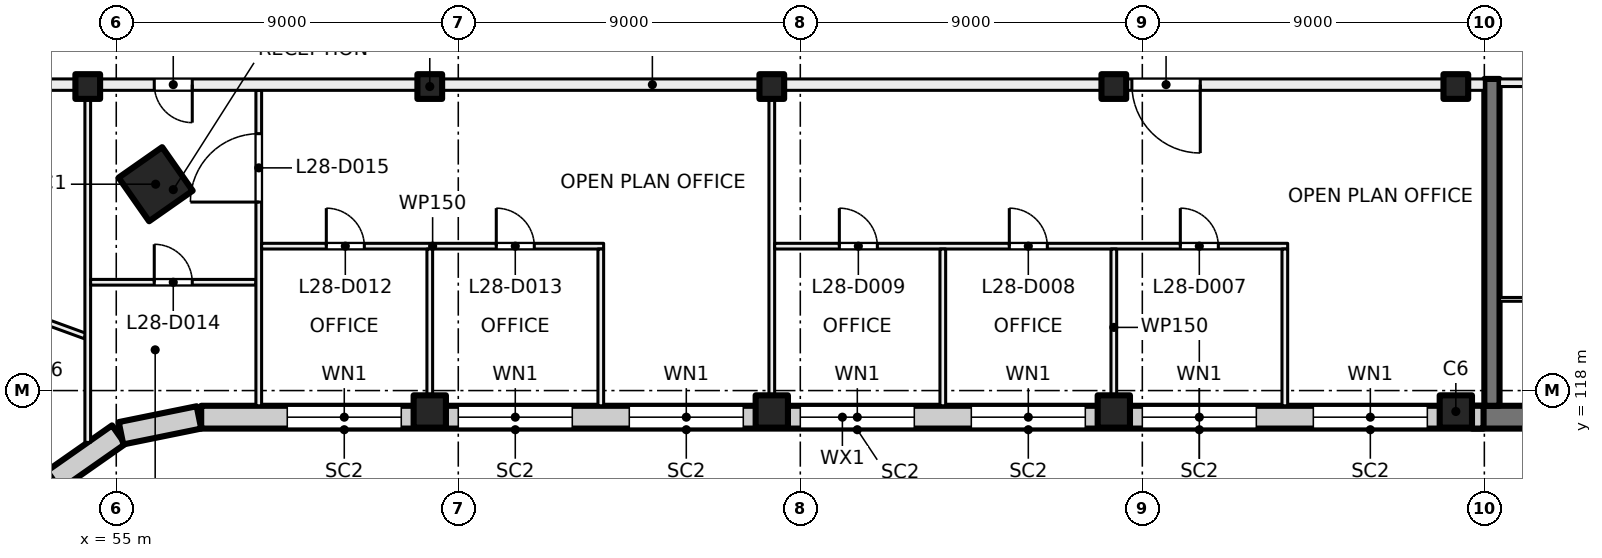
"""IFC4 building model, lengths in metres.
Left out: names, types, materials, properties, quantities, classifications, styles, units other than length and angle.
Written with IfcOpenShell. Run it as: python <this file> out.ifc"""

import sys

from ifc_helpers import new_model, si_unit, direction, frame, frame_2d, origin, origin_2d, place, context, subcontext, project, spatial, rectangle, hollow_rectangle, extrude, element, fill, save


model = new_model("IFC4")
c1 = context("Model", 3, precision=1e-05, world=origin(), true_north=direction((0.0, 1.0)))
c2 = subcontext(c1, "Body", "Model", "MODEL_VIEW")
j1 = project(units=[si_unit("LENGTHUNIT", "METRE"), si_unit("PLANEANGLEUNIT", "RADIAN")], contexts=[c1])
p1 = place(None, origin())
s1 = spatial("IfcSite", under=j1, at=p1, CompositionType="ELEMENT")
p2 = place(p1, origin())
s2 = spatial("IfcBuilding", under=s1, at=p2, CompositionType="ELEMENT")
p3 = place(p2, frame((0.0, 0.0, 121.0)))
s3 = spatial("IfcBuildingStorey", under=s2, at=p3, CompositionType="ELEMENT", Elevation=121.0)
p4 = place(p3, frame((56.036, 123.43, 0.0), z_axis=(0.0, 0.0, 1.0), x_axis=(0.573576436351, -0.819152044289, 0.0)))
e1 = element("IfcColumn", 1, at=p4, inside=s3, PredefinedType="COLUMN", context=c2, shape_type="SweptSolid", body=[
    extrude(hollow_rectangle(XDim=1.4, YDim=1.4, WallThickness=0.04, at=origin_2d()), origin(), (0.0, 0.0, 1.0), 4.0),
])
for number, where, z_axis, x_axis in (
    (2, (54.25, 126.0, 0.0), (0.0, 0.0, 1.0), (1.0, 0.0, 0.0)),
    (3, (63.25, 126.0, 0.0), (0.0, 0.0, 1.0), (1.0, 0.0, 0.0)),
    (4, (72.25, 126.0, 0.0), (0.0, 0.0, 1.0), (1.0, 0.0, 0.0)),
    (5, (81.25, 126.0, 0.0), (0.0, 0.0, 1.0), (1.0, 0.0, 0.0)),
    (6, (90.25, 126.0, 0.0), (0.0, 0.0, 1.0), (1.0, 0.0, 0.0)),
):
    element("IfcColumn", number, at=place(p3, frame(where, z_axis=z_axis, x_axis=x_axis)), inside=s3, PredefinedType="COLUMN", context=c2, shape_type="SweptSolid", body=[
        extrude(rectangle(XDim=0.65, YDim=0.65, at=origin_2d()), origin(), (0.0, 0.0, 1.0), 4.0),
    ])
for number, where, z_axis, x_axis in (
    (7, (63.25, 117.45, 0.0), (0.0, 0.0, 1.0), (1.0, 0.0, 0.0)),
    (8, (72.25, 117.45, 0.0), (0.0, 0.0, 1.0), (1.0, 0.0, 0.0)),
    (9, (81.25, 117.45, 0.0), (0.0, 0.0, 1.0), (1.0, 0.0, 0.0)),
    (10, (90.25, 117.45, 0.0), (0.0, 0.0, 1.0), (1.0, 0.0, 0.0)),
):
    element("IfcColumn", number, at=place(p3, frame(where, z_axis=z_axis, x_axis=x_axis)), inside=s3, PredefinedType="COLUMN", context=c2, shape_type="SweptSolid", body=[
        extrude(rectangle(XDim=0.85, YDim=0.85, at=origin_2d()), origin(), (0.0, 0.0, 1.0), 4.0),
    ])
p5 = place(p3, frame((99.6, 117.3, 0.0), z_axis=(0.0, 0.0, 1.0), x_axis=(-1.0, 0.0, 0.0)))
e11 = element("IfcWall", 11, at=p5, inside=s3, PredefinedType="SHEAR", context=c2, shape_type="SweptSolid", body=[
    extrude(rectangle(XDim=8.925, YDim=0.6, at=frame_2d((4.462, 0.0))), origin(), (0.0, 0.0, 1.0), 4.0),
])
p6 = place(p3, frame((91.2, 126.2, 0.0), z_axis=(0.0, 0.0, 1.0), x_axis=(0.0, -1.0, 0.0)))
e12 = element("IfcWall", 12, at=p6, inside=s3, PredefinedType="SHEAR", context=c2, shape_type="SweptSolid", body=[
    extrude(rectangle(XDim=8.6, YDim=0.4, at=frame_2d((4.3, 0.0))), origin(), (0.0, 0.0, 1.0), 4.0),
])
p7 = place(p3, frame((53.305, 115.578, 0.0), z_axis=(0.0, 0.0, 1.0), x_axis=(-0.522402266438, -0.852699168535, 0.0)))
e13 = element("IfcWall", 13, at=p7, inside=s3, PredefinedType="SOLIDWALL", context=c2, shape_type="SweptSolid", body=[
    extrude(rectangle(XDim=2.042, YDim=0.6, at=frame_2d((1.021, 0.0))), origin(), (0.0, 0.0, 1.0), 3.625),
])
for number, where, z_axis, x_axis in (
    (14, (55.062, 116.839, 0.0), (0.0, 0.0, 1.0), (-0.819, -0.574, 0.0)),
    (15, (57.175, 117.294, 0.0), (0.0, 0.0, 1.0), (-0.98, -0.199, 0.0)),
):
    element("IfcWall", number, at=place(p3, frame(where, z_axis=z_axis, x_axis=x_axis)), inside=s3, PredefinedType="SOLIDWALL", context=c2, shape_type="SweptSolid", body=[
        extrude(rectangle(XDim=2.092, YDim=0.6, at=frame_2d((1.046, 0.0))), origin(), (0.0, 0.0, 1.0), 3.625),
    ])
p8 = place(p3, frame((90.98, 117.3, 0.0), z_axis=(0.0, 0.0, 1.0), x_axis=(-1.0, 0.0, 0.0)))
e16 = element("IfcWall", 16, at=p8, inside=s3, PredefinedType="SOLIDWALL", context=c2, shape_type="SweptSolid", body=[
    extrude(rectangle(XDim=33.745, YDim=0.6, at=frame_2d((16.873, 0.0))), origin(), (0.0, 0.0, 1.0), 3.625),
])
p9 = place(p8, frame((1.48, 0.0, 0.9)))
e17 = element("IfcOpeningElement", 17, at=p9, cuts=e16, PredefinedType="OPENING", context=c2, shape_type="SweptSolid", body=[
    extrude(rectangle(XDim=3.0, YDim=2.4, at=frame_2d((1.5, 1.2))), frame((0.0, 0.31, 0.0), z_axis=(0.0, -1.0, 0.0), x_axis=(1.0, 0.0, 0.0)), (0.0, 0.0, 1.0), 0.62),
])
p10 = place(p8, frame((5.98, 0.0, 0.9)))
e18 = element("IfcOpeningElement", 18, at=p10, cuts=e16, PredefinedType="OPENING", context=c2, shape_type="SweptSolid", body=[
    extrude(rectangle(XDim=3.0, YDim=2.4, at=frame_2d((1.5, 1.2))), frame((0.0, 0.31, 0.0), z_axis=(0.0, -1.0, 0.0), x_axis=(1.0, 0.0, 0.0)), (0.0, 0.0, 1.0), 0.62),
])
p11 = place(p8, frame((10.48, 0.0, 0.9)))
e19 = element("IfcOpeningElement", 19, at=p11, cuts=e16, PredefinedType="OPENING", context=c2, shape_type="SweptSolid", body=[
    extrude(rectangle(XDim=3.0, YDim=2.4, at=frame_2d((1.5, 1.2))), frame((0.0, 0.31, 0.0), z_axis=(0.0, -1.0, 0.0), x_axis=(1.0, 0.0, 0.0)), (0.0, 0.0, 1.0), 0.62),
])
p12 = place(p8, frame((14.98, 0.0, 0.9)))
e20 = element("IfcOpeningElement", 20, at=p12, cuts=e16, PredefinedType="OPENING", context=c2, shape_type="SweptSolid", body=[
    extrude(rectangle(XDim=3.0, YDim=2.4, at=frame_2d((1.5, 1.2))), frame((0.0, 0.31, 0.0), z_axis=(0.0, -1.0, 0.0), x_axis=(1.0, 0.0, 0.0)), (0.0, 0.0, 1.0), 0.62),
])
p13 = place(p8, frame((19.48, 0.0, 0.9)))
e21 = element("IfcOpeningElement", 21, at=p13, cuts=e16, PredefinedType="OPENING", context=c2, shape_type="SweptSolid", body=[
    extrude(rectangle(XDim=3.0, YDim=2.4, at=frame_2d((1.5, 1.2))), frame((0.0, 0.31, 0.0), z_axis=(0.0, -1.0, 0.0), x_axis=(1.0, 0.0, 0.0)), (0.0, 0.0, 1.0), 0.62),
])
p14 = place(p8, frame((23.98, 0.0, 0.9)))
e22 = element("IfcOpeningElement", 22, at=p14, cuts=e16, PredefinedType="OPENING", context=c2, shape_type="SweptSolid", body=[
    extrude(rectangle(XDim=3.0, YDim=2.4, at=frame_2d((1.5, 1.2))), frame((0.0, 0.31, 0.0), z_axis=(0.0, -1.0, 0.0), x_axis=(1.0, 0.0, 0.0)), (0.0, 0.0, 1.0), 0.62),
])
p15 = place(p8, frame((28.48, 0.0, 0.9)))
e23 = element("IfcOpeningElement", 23, at=p15, cuts=e16, PredefinedType="OPENING", context=c2, shape_type="SweptSolid", body=[
    extrude(rectangle(XDim=3.0, YDim=2.4, at=frame_2d((1.5, 1.2))), frame((0.0, 0.31, 0.0), z_axis=(0.0, -1.0, 0.0), x_axis=(1.0, 0.0, 0.0)), (0.0, 0.0, 1.0), 0.62),
])
p16 = place(p3, frame((95.2, 126.1, 0.0), z_axis=(0.0, 0.0, 1.0), x_axis=(-1.0, 0.0, 0.0)))
e24 = element("IfcWall", 24, at=p16, inside=s3, PredefinedType="PARTITIONING", context=c2, shape_type="SweptSolid", body=[
    extrude(rectangle(XDim=3.8, YDim=0.2, at=frame_2d((1.9, 0.0))), origin(), (0.0, 0.0, 1.0), 3.625),
])
p17 = place(p16, frame((0.3, 0.0, 0.0)))
e25 = element("IfcOpeningElement", 25, at=p17, cuts=e24, PredefinedType="OPENING", context=c2, shape_type="SweptSolid", body=[
    extrude(rectangle(XDim=1.2, YDim=2.1, at=frame_2d((0.6, 1.05))), frame((0.0, 0.11, 0.0), z_axis=(0.0, -1.0, 0.0), x_axis=(1.0, 0.0, 0.0)), (0.0, 0.0, 1.0), 0.22),
])
p18 = place(p3, frame((93.35, 120.4, 0.0), z_axis=(0.0, 0.0, 1.0), x_axis=(-1.0, 0.0, 0.0)))
e26 = element("IfcWall", 26, at=p18, inside=s3, PredefinedType="PARTITIONING", context=c2, shape_type="SweptSolid", body=[
    extrude(rectangle(XDim=1.95, YDim=0.1, at=frame_2d((0.975, 0.0))), origin(), (0.0, 0.0, 1.0), 3.625),
])
p19 = place(p3, frame((46.178, 122.349, 0.0), z_axis=(0.0, 0.0, 1.0), x_axis=(0.939669476286, -0.342083725624, 0.0)))
e27 = element("IfcWall", 27, at=p19, inside=s3, PredefinedType="PARTITIONING", context=c2, shape_type="SweptSolid", body=[
    extrude(rectangle(XDim=8.516, YDim=0.15, at=frame_2d((4.258, 0.0))), origin(), (0.0, 0.0, 1.0), 3.625),
])
p20 = place(p3, frame((54.25, 116.637, 0.0), z_axis=(0.0, 0.0, 1.0), x_axis=(0.0, 1.0, 0.0)))
e28 = element("IfcWall", 28, at=p20, inside=s3, PredefinedType="PARTITIONING", context=c2, shape_type="SweptSolid", body=[
    extrude(rectangle(XDim=9.263, YDim=0.15, at=frame_2d((4.631, 0.0))), origin(), (0.0, 0.0, 1.0), 3.625),
])
p21 = place(p3, frame((54.325, 120.85, 0.0), z_axis=(0.0, 0.0, 1.0), x_axis=(1.0, 0.0, 0.0)))
e29 = element("IfcWall", 29, at=p21, inside=s3, PredefinedType="PARTITIONING", context=c2, shape_type="SweptSolid", body=[
    extrude(rectangle(XDim=4.35, YDim=0.15, at=frame_2d((2.175, 0.0))), origin(), (0.0, 0.0, 1.0), 3.625),
])
p22 = place(p21, frame((1.675, 0.0, 0.0)))
e30 = element("IfcOpeningElement", 30, at=p22, cuts=e29, PredefinedType="OPENING", context=c2, shape_type="SweptSolid", body=[
    extrude(rectangle(XDim=1.0, YDim=2.1, at=frame_2d((0.5, 1.05))), frame((0.0, 0.085, 0.0), z_axis=(0.0, -1.0, 0.0), x_axis=(1.0, 0.0, 0.0)), (0.0, 0.0, 1.0), 0.17),
])
p23 = place(p3, frame((58.75, 117.6, 0.0), z_axis=(0.0, 0.0, 1.0), x_axis=(0.0, 1.0, 0.0)))
e31 = element("IfcWall", 31, at=p23, inside=s3, PredefinedType="PARTITIONING", context=c2, shape_type="SweptSolid", body=[
    extrude(rectangle(XDim=8.3, YDim=0.15, at=frame_2d((4.15, 0.0))), origin(), (0.0, 0.0, 1.0), 3.625),
])
p24 = place(p23, frame((5.36, 0.0, 0.0)))
e32 = element("IfcOpeningElement", 32, at=p24, cuts=e31, PredefinedType="OPENING", context=c2, shape_type="SweptSolid", body=[
    extrude(rectangle(XDim=1.8, YDim=2.1, at=frame_2d((0.9, 1.05))), frame((0.0, 0.085, 0.0), z_axis=(0.0, -1.0, 0.0), x_axis=(1.0, 0.0, 0.0)), (0.0, 0.0, 1.0), 0.17),
])
p25 = place(p3, frame((58.825, 121.8, 0.0), z_axis=(0.0, 0.0, 1.0), x_axis=(1.0, 0.0, 0.0)))
e33 = element("IfcWall", 33, at=p25, inside=s3, PredefinedType="PARTITIONING", context=c2, shape_type="SweptSolid", body=[
    extrude(rectangle(XDim=9.0, YDim=0.15, at=frame_2d((4.5, 0.0))), origin(), (0.0, 0.0, 1.0), 3.625),
])
p26 = place(p25, frame((1.702, 0.0, 0.0)))
e34 = element("IfcOpeningElement", 34, at=p26, cuts=e33, PredefinedType="OPENING", context=c2, shape_type="SweptSolid", body=[
    extrude(rectangle(XDim=1.0, YDim=2.1, at=frame_2d((0.5, 1.05))), frame((0.0, 0.085, 0.0), z_axis=(0.0, -1.0, 0.0), x_axis=(1.0, 0.0, 0.0)), (0.0, 0.0, 1.0), 0.17),
])
p27 = place(p25, frame((6.175, 0.0, 0.0)))
e35 = element("IfcOpeningElement", 35, at=p27, cuts=e33, PredefinedType="OPENING", context=c2, shape_type="SweptSolid", body=[
    extrude(rectangle(XDim=1.0, YDim=2.1, at=frame_2d((0.5, 1.05))), frame((0.0, 0.085, 0.0), z_axis=(0.0, -1.0, 0.0), x_axis=(1.0, 0.0, 0.0)), (0.0, 0.0, 1.0), 0.17),
])
for number, where, z_axis, x_axis in (
    (36, (63.25, 121.725, 0.0), (0.0, 0.0, 1.0), (0.0, -1.0, 0.0)),
    (37, (67.75, 117.6, 0.0), (0.0, 0.0, 1.0), (0.0, 1.0, 0.0)),
):
    element("IfcWall", number, at=place(p3, frame(where, z_axis=z_axis, x_axis=x_axis)), inside=s3, PredefinedType="PARTITIONING", context=c2, shape_type="SweptSolid", body=[
        extrude(rectangle(XDim=4.125, YDim=0.15, at=frame_2d((2.062, 0.0))), origin(), (0.0, 0.0, 1.0), 3.625),
    ])
p28 = place(p3, frame((72.25, 117.6, 0.0), z_axis=(0.0, 0.0, 1.0), x_axis=(0.0, 1.0, 0.0)))
e38 = element("IfcWall", 38, at=p28, inside=s3, PredefinedType="PARTITIONING", context=c2, shape_type="SweptSolid", body=[
    extrude(rectangle(XDim=8.3, YDim=0.15, at=frame_2d((4.15, 0.0))), origin(), (0.0, 0.0, 1.0), 3.625),
])
p29 = place(p3, frame((72.325, 121.8, 0.0), z_axis=(0.0, 0.0, 1.0), x_axis=(1.0, 0.0, 0.0)))
e39 = element("IfcWall", 39, at=p29, inside=s3, PredefinedType="PARTITIONING", context=c2, shape_type="SweptSolid", body=[
    extrude(rectangle(XDim=13.5, YDim=0.15, at=frame_2d((6.75, 0.0))), origin(), (0.0, 0.0, 1.0), 3.625),
])
p30 = place(p29, frame((10.675, 0.0, 0.0)))
e40 = element("IfcOpeningElement", 40, at=p30, cuts=e39, PredefinedType="OPENING", context=c2, shape_type="SweptSolid", body=[
    extrude(rectangle(XDim=1.0, YDim=2.1, at=frame_2d((0.5, 1.05))), frame((0.0, 0.085, 0.0), z_axis=(0.0, -1.0, 0.0), x_axis=(1.0, 0.0, 0.0)), (0.0, 0.0, 1.0), 0.17),
])
p31 = place(p29, frame((6.175, 0.0, 0.0)))
e41 = element("IfcOpeningElement", 41, at=p31, cuts=e39, PredefinedType="OPENING", context=c2, shape_type="SweptSolid", body=[
    extrude(rectangle(XDim=1.0, YDim=2.1, at=frame_2d((0.5, 1.05))), frame((0.0, 0.085, 0.0), z_axis=(0.0, -1.0, 0.0), x_axis=(1.0, 0.0, 0.0)), (0.0, 0.0, 1.0), 0.17),
])
p32 = place(p29, frame((1.702, 0.0, 0.0)))
e42 = element("IfcOpeningElement", 42, at=p32, cuts=e39, PredefinedType="OPENING", context=c2, shape_type="SweptSolid", body=[
    extrude(rectangle(XDim=1.0, YDim=2.1, at=frame_2d((0.5, 1.05))), frame((0.0, 0.085, 0.0), z_axis=(0.0, -1.0, 0.0), x_axis=(1.0, 0.0, 0.0)), (0.0, 0.0, 1.0), 0.17),
])
for number, where, z_axis, x_axis in (
    (43, (76.75, 117.6, 0.0), (0.0, 0.0, 1.0), (0.0, 1.0, 0.0)),
    (44, (81.25, 117.6, 0.0), (0.0, 0.0, 1.0), (0.0, 1.0, 0.0)),
    (45, (85.75, 117.6, 0.0), (0.0, 0.0, 1.0), (0.0, 1.0, 0.0)),
):
    element("IfcWall", number, at=place(p3, frame(where, z_axis=z_axis, x_axis=x_axis)), inside=s3, PredefinedType="PARTITIONING", context=c2, shape_type="SweptSolid", body=[
        extrude(rectangle(XDim=4.125, YDim=0.15, at=frame_2d((2.062, 0.0))), origin(), (0.0, 0.0, 1.0), 3.625),
    ])
p33 = place(p3, frame((91.0, 126.05, 0.0), z_axis=(0.0, 0.0, 1.0), x_axis=(-1.0, 0.0, 0.0)))
e46 = element("IfcWall", 46, at=p33, inside=s3, PredefinedType="PARTITIONING", context=c2, shape_type="SweptSolid", body=[
    extrude(rectangle(XDim=43.785, YDim=0.3, at=frame_2d((21.893, 0.0))), origin(), (0.0, 0.0, 1.0), 3.625),
])
p34 = place(p33, frame((7.475, 0.0, 0.0)))
e47 = element("IfcOpeningElement", 47, at=p34, cuts=e46, PredefinedType="OPENING", context=c2, shape_type="SweptSolid", body=[
    extrude(rectangle(XDim=1.8, YDim=2.1, at=frame_2d((0.9, 1.05))), frame((0.0, 0.16, 0.0), z_axis=(0.0, -1.0, 0.0), x_axis=(1.0, 0.0, 0.0)), (0.0, 0.0, 1.0), 0.32),
])
p35 = place(p33, frame((34.0, 0.0, 0.0)))
e48 = element("IfcOpeningElement", 48, at=p35, cuts=e46, PredefinedType="OPENING", context=c2, shape_type="SweptSolid", body=[
    extrude(rectangle(XDim=1.0, YDim=2.1, at=frame_2d((0.5, 1.05))), frame((0.0, 0.16, 0.0), z_axis=(0.0, -1.0, 0.0), x_axis=(1.0, 0.0, 0.0)), (0.0, 0.0, 1.0), 0.32),
])
p36 = place(p33, frame((39.296, 0.0, 0.0)))
e49 = element("IfcOpeningElement", 49, at=p36, cuts=e46, PredefinedType="OPENING", context=c2, shape_type="SweptSolid", body=[
    extrude(rectangle(XDim=1.8, YDim=2.1, at=frame_2d((0.9, 1.05))), frame((0.0, 0.16, 0.0), z_axis=(0.0, -1.0, 0.0), x_axis=(1.0, 0.0, 0.0)), (0.0, 0.0, 1.0), 0.32),
])
p37 = place(p9, origin())
e50 = element("IfcWindow", 50, at=p37, inside=s3, PartitioningType="SINGLE_PANEL", PredefinedType="WINDOW", context=c2, shape_type="SweptSolid", body=[
    extrude(rectangle(XDim=3.0, YDim=2.4, at=frame_2d((1.5, 1.2))), frame((0.0, 0.03, 0.0), z_axis=(0.0, -1.0, 0.0), x_axis=(1.0, 0.0, 0.0)), (0.0, 0.0, 1.0), 0.06),
])
fill(e17, e50)
p38 = place(p10, origin())
e51 = element("IfcWindow", 51, at=p38, inside=s3, PartitioningType="SINGLE_PANEL", PredefinedType="WINDOW", context=c2, shape_type="SweptSolid", body=[
    extrude(rectangle(XDim=3.0, YDim=2.4, at=frame_2d((1.5, 1.2))), frame((0.0, 0.03, 0.0), z_axis=(0.0, -1.0, 0.0), x_axis=(1.0, 0.0, 0.0)), (0.0, 0.0, 1.0), 0.06),
])
fill(e18, e51)
p39 = place(p11, origin())
e52 = element("IfcWindow", 52, at=p39, inside=s3, PartitioningType="SINGLE_PANEL", PredefinedType="WINDOW", context=c2, shape_type="SweptSolid", body=[
    extrude(rectangle(XDim=3.0, YDim=2.4, at=frame_2d((1.5, 1.2))), frame((0.0, 0.03, 0.0), z_axis=(0.0, -1.0, 0.0), x_axis=(1.0, 0.0, 0.0)), (0.0, 0.0, 1.0), 0.06),
])
fill(e19, e52)
p40 = place(p12, origin())
e53 = element("IfcWindow", 53, at=p40, inside=s3, PartitioningType="SINGLE_PANEL", PredefinedType="WINDOW", context=c2, shape_type="SweptSolid", body=[
    extrude(rectangle(XDim=3.0, YDim=2.4, at=frame_2d((1.5, 1.2))), frame((0.0, 0.03, 0.0), z_axis=(0.0, -1.0, 0.0), x_axis=(1.0, 0.0, 0.0)), (0.0, 0.0, 1.0), 0.06),
])
fill(e20, e53)
p41 = place(p13, origin())
e54 = element("IfcWindow", 54, at=p41, inside=s3, PartitioningType="SINGLE_PANEL", PredefinedType="WINDOW", context=c2, shape_type="SweptSolid", body=[
    extrude(rectangle(XDim=3.0, YDim=2.4, at=frame_2d((1.5, 1.2))), frame((0.0, 0.03, 0.0), z_axis=(0.0, -1.0, 0.0), x_axis=(1.0, 0.0, 0.0)), (0.0, 0.0, 1.0), 0.06),
])
fill(e21, e54)
p42 = place(p14, origin())
e55 = element("IfcWindow", 55, at=p42, inside=s3, PartitioningType="SINGLE_PANEL", PredefinedType="WINDOW", context=c2, shape_type="SweptSolid", body=[
    extrude(rectangle(XDim=3.0, YDim=2.4, at=frame_2d((1.5, 1.2))), frame((0.0, 0.03, 0.0), z_axis=(0.0, -1.0, 0.0), x_axis=(1.0, 0.0, 0.0)), (0.0, 0.0, 1.0), 0.06),
])
fill(e22, e55)
p43 = place(p15, origin())
e56 = element("IfcWindow", 56, at=p43, inside=s3, PartitioningType="SINGLE_PANEL", PredefinedType="WINDOW", context=c2, shape_type="SweptSolid", body=[
    extrude(rectangle(XDim=3.0, YDim=2.4, at=frame_2d((1.5, 1.2))), frame((0.0, 0.03, 0.0), z_axis=(0.0, -1.0, 0.0), x_axis=(1.0, 0.0, 0.0)), (0.0, 0.0, 1.0), 0.06),
])
fill(e23, e56)
p44 = place(p30, origin())
e57 = element("IfcDoor", 57, at=p44, inside=s3, OperationType="SINGLE_SWING_LEFT", PredefinedType="DOOR", context=c2, shape_type="SweptSolid", body=[
    extrude(rectangle(XDim=1.0, YDim=2.1, at=frame_2d((0.5, 1.05))), frame((0.0, 0.025, 0.0), z_axis=(0.0, -1.0, 0.0), x_axis=(1.0, 0.0, 0.0)), (0.0, 0.0, 1.0), 0.05),
])
fill(e40, e57)
p45 = place(p31, origin())
e58 = element("IfcDoor", 58, at=p45, inside=s3, OperationType="SINGLE_SWING_RIGHT", PredefinedType="DOOR", context=c2, shape_type="SweptSolid", body=[
    extrude(rectangle(XDim=1.0, YDim=2.1, at=frame_2d((0.5, 1.05))), frame((0.0, 0.025, 0.0), z_axis=(0.0, -1.0, 0.0), x_axis=(1.0, 0.0, 0.0)), (0.0, 0.0, 1.0), 0.05),
])
fill(e41, e58)
p46 = place(p32, origin())
e59 = element("IfcDoor", 59, at=p46, inside=s3, OperationType="SINGLE_SWING_LEFT", PredefinedType="DOOR", context=c2, shape_type="SweptSolid", body=[
    extrude(rectangle(XDim=1.0, YDim=2.1, at=frame_2d((0.5, 1.05))), frame((0.0, 0.025, 0.0), z_axis=(0.0, -1.0, 0.0), x_axis=(1.0, 0.0, 0.0)), (0.0, 0.0, 1.0), 0.05),
])
fill(e42, e59)
p47 = place(p34, origin())
e60 = element("IfcDoor", 60, at=p47, inside=s3, OperationType="DOUBLE_DOOR_SINGLE_SWING", PredefinedType="DOOR", context=c2, shape_type="SweptSolid", body=[
    extrude(rectangle(XDim=1.8, YDim=2.1, at=frame_2d((0.9, 1.05))), frame((0.0, 0.025, 0.0), z_axis=(0.0, -1.0, 0.0), x_axis=(1.0, 0.0, 0.0)), (0.0, 0.0, 1.0), 0.05),
])
fill(e47, e60)
p48 = place(p35, origin())
e61 = element("IfcDoor", 61, at=p48, inside=s3, OperationType="SINGLE_SWING_LEFT", PredefinedType="DOOR", context=c2, shape_type="SweptSolid", body=[
    extrude(rectangle(XDim=1.0, YDim=2.1, at=frame_2d((0.5, 1.05))), frame((0.0, 0.025, 0.0), z_axis=(0.0, -1.0, 0.0), x_axis=(1.0, 0.0, 0.0)), (0.0, 0.0, 1.0), 0.05),
])
fill(e48, e61)
p49 = place(p26, origin())
e62 = element("IfcDoor", 62, at=p49, inside=s3, OperationType="SINGLE_SWING_LEFT", PredefinedType="DOOR", context=c2, shape_type="SweptSolid", body=[
    extrude(rectangle(XDim=1.0, YDim=2.1, at=frame_2d((0.5, 1.05))), frame((0.0, 0.025, 0.0), z_axis=(0.0, -1.0, 0.0), x_axis=(1.0, 0.0, 0.0)), (0.0, 0.0, 1.0), 0.05),
])
fill(e34, e62)
p50 = place(p27, origin())
e63 = element("IfcDoor", 63, at=p50, inside=s3, OperationType="SINGLE_SWING_RIGHT", PredefinedType="DOOR", context=c2, shape_type="SweptSolid", body=[
    extrude(rectangle(XDim=1.0, YDim=2.1, at=frame_2d((0.5, 1.05))), frame((0.0, 0.025, 0.0), z_axis=(0.0, -1.0, 0.0), x_axis=(1.0, 0.0, 0.0)), (0.0, 0.0, 1.0), 0.05),
])
fill(e35, e63)
p51 = place(p22, origin())
e64 = element("IfcDoor", 64, at=p51, inside=s3, OperationType="SINGLE_SWING_LEFT", PredefinedType="DOOR", context=c2, shape_type="SweptSolid", body=[
    extrude(rectangle(XDim=1.0, YDim=2.1, at=frame_2d((0.5, 1.05))), frame((0.0, 0.025, 0.0), z_axis=(0.0, -1.0, 0.0), x_axis=(1.0, 0.0, 0.0)), (0.0, 0.0, 1.0), 0.05),
])
fill(e30, e64)
p52 = place(p24, origin())
e65 = element("IfcDoor", 65, at=p52, inside=s3, OperationType="DOUBLE_DOOR_SINGLE_SWING", PredefinedType="DOOR", context=c2, shape_type="SweptSolid", body=[
    extrude(rectangle(XDim=1.8, YDim=2.1, at=frame_2d((0.9, 1.05))), frame((0.0, 0.025, 0.0), z_axis=(0.0, -1.0, 0.0), x_axis=(1.0, 0.0, 0.0)), (0.0, 0.0, 1.0), 0.05),
])
fill(e32, e65)
save(model, sys.argv[1])
